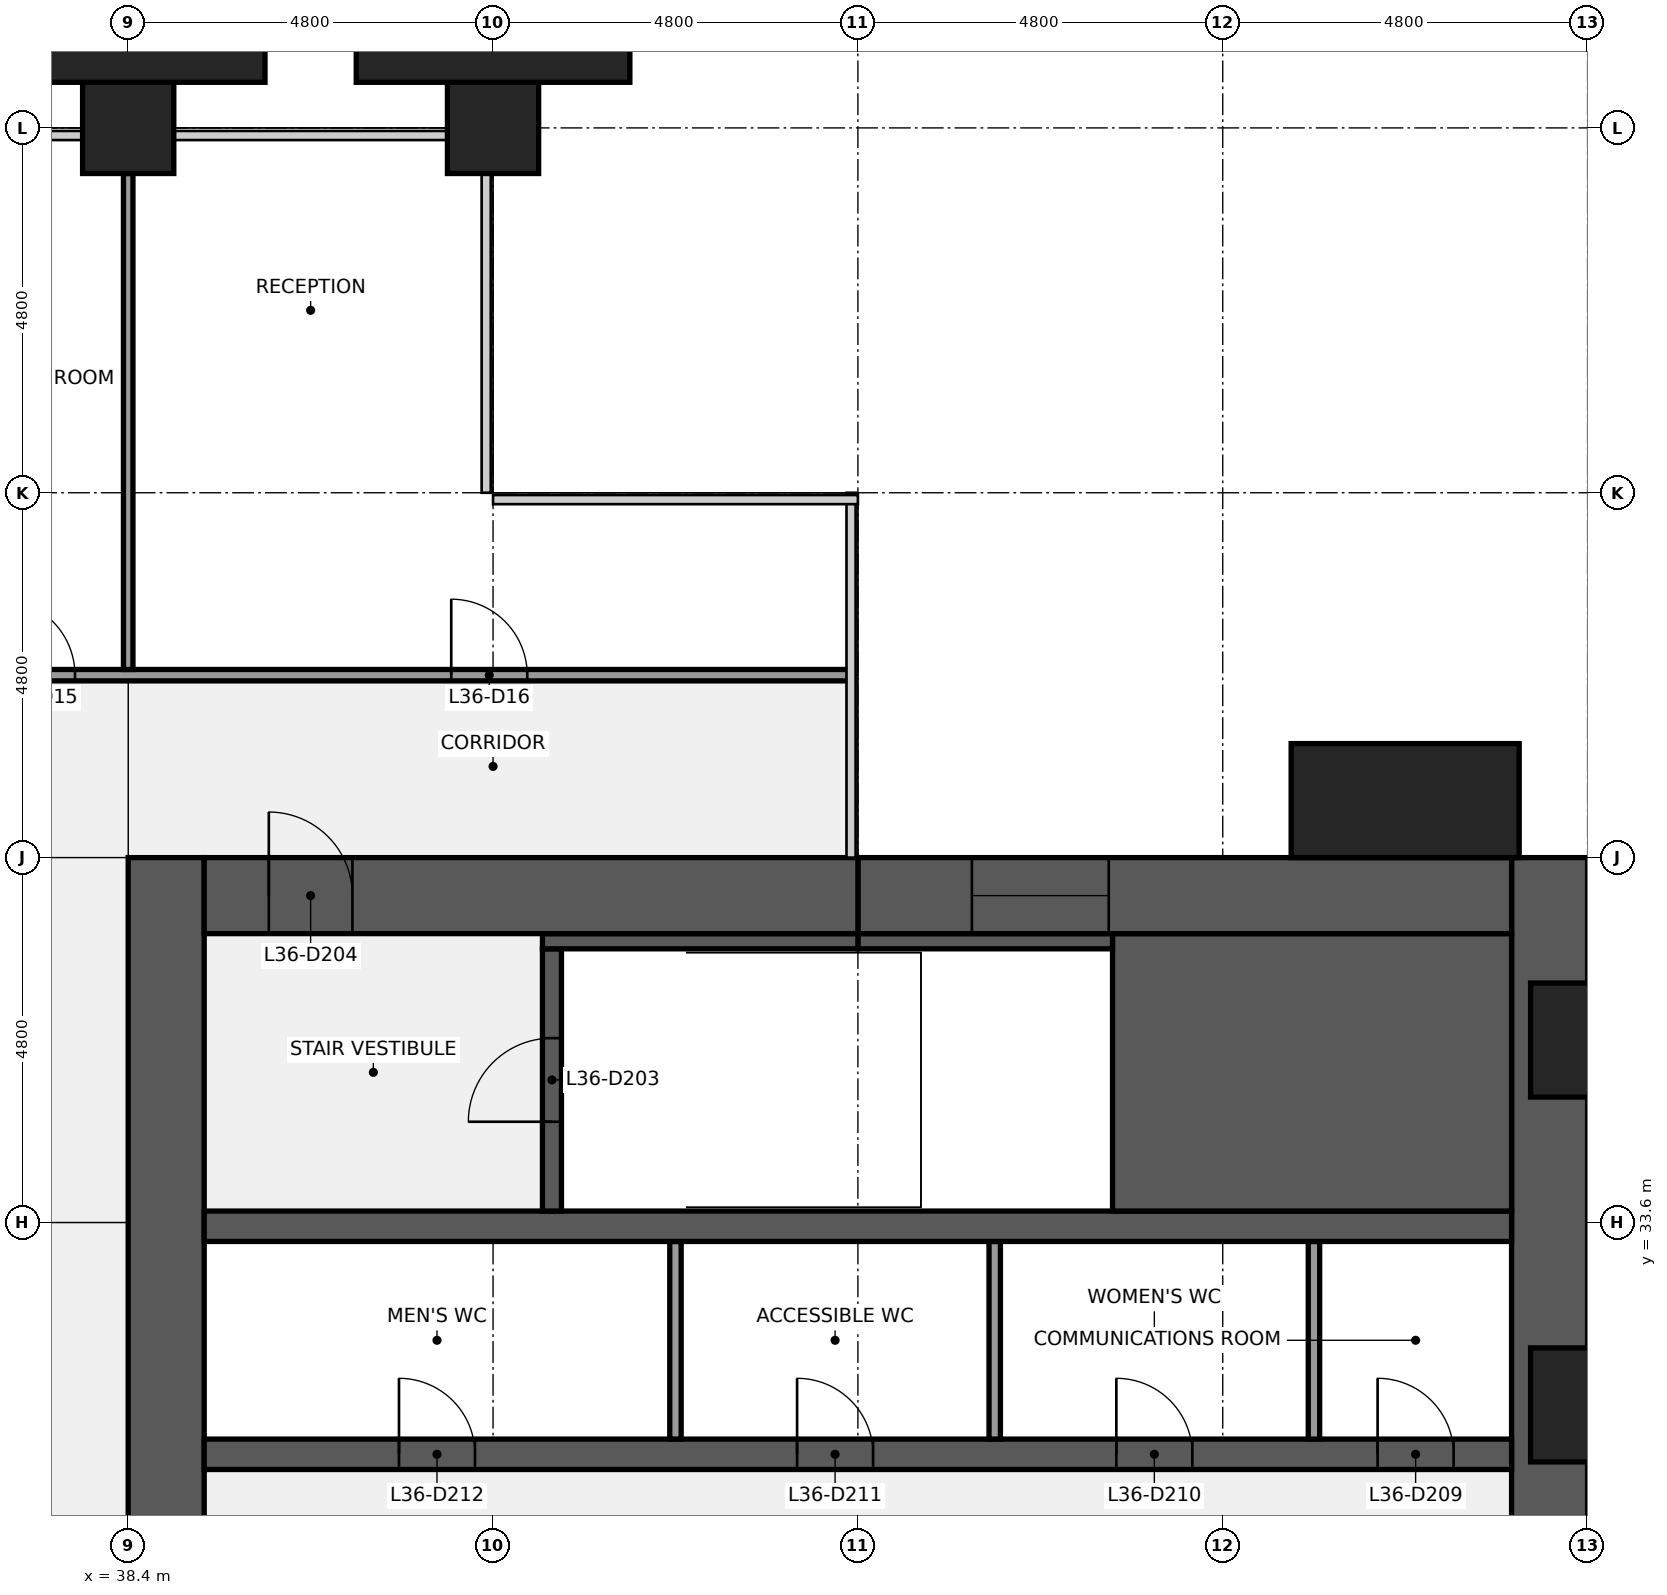
"""IFC4 building model, lengths in metres.
Left out: names, types, materials, properties, quantities, classifications, styles, units other than length and angle.
Written with IfcOpenShell. Run it as: python <this file> out.ifc"""

import sys

from ifc_helpers import new_model, si_unit, direction, frame, frame_2d, origin, origin_2d, place, context, subcontext, project, spatial, rectangle, extrude, element, fill, save


model = new_model("IFC4")
c1 = context("Model", 3, precision=1e-05, world=origin(), true_north=direction((0.0, 1.0)))
c2 = subcontext(c1, "Body", "Model", "MODEL_VIEW")
j1 = project(units=[si_unit("LENGTHUNIT", "METRE"), si_unit("PLANEANGLEUNIT", "RADIAN")], contexts=[c1])
p1 = place(None, origin())
s1 = spatial("IfcSite", under=j1, at=p1, CompositionType="ELEMENT")
p2 = place(p1, origin())
s2 = spatial("IfcBuilding", under=s1, at=p2, CompositionType="ELEMENT")
p3 = place(p2, frame((0.0, 0.0, 164.1)))
s3 = spatial("IfcBuildingStorey", under=s2, at=p3, CompositionType="ELEMENT", Elevation=164.1)
for number, where, z_axis, x_axis in (
    (1, (38.4, 48.0, 0.0), (0.0, 0.0, 1.0), (1.0, 0.0, 0.0)),
    (2, (43.2, 48.0, 0.0), (0.0, 0.0, 1.0), (1.0, 0.0, 0.0)),
):
    element("IfcColumn", number, at=place(p3, frame(where, z_axis=z_axis, x_axis=x_axis)), inside=s3, PredefinedType="COLUMN", context=c2, shape_type="SweptSolid", body=[
        extrude(rectangle(XDim=1.2, YDim=1.2, at=origin_2d()), origin(), (0.0, 0.0, 1.0), 4.0),
    ])
p4 = place(p3, frame((57.1, 38.4, 0.0), z_axis=(0.0, 0.0, 1.0), x_axis=(0.0, -1.0, 0.0)))
e3 = element("IfcWall", 3, at=p4, inside=s3, PredefinedType="SHEAR", context=c2, shape_type="SweptSolid", body=[
    extrude(rectangle(XDim=28.8, YDim=1.0, at=frame_2d((14.4, 0.0))), origin(), (0.0, 0.0, 1.0), 3.84),
])
p5 = place(p4, frame((18.45, 0.0, 0.9)))
e4 = element("IfcOpeningElement", 4, at=p5, cuts=e3, PredefinedType="OPENING", context=c2, shape_type="SweptSolid", body=[
    extrude(rectangle(XDim=1.5, YDim=1.5, at=frame_2d((0.75, 0.75))), frame((0.0, 0.51, 0.0), z_axis=(0.0, -1.0, 0.0), x_axis=(1.0, 0.0, 0.0)), (0.0, 0.0, 1.0), 1.02),
])
p6 = place(p4, frame((8.85, 0.0, 0.9)))
e5 = element("IfcOpeningElement", 5, at=p6, cuts=e3, PredefinedType="OPENING", context=c2, shape_type="SweptSolid", body=[
    extrude(rectangle(XDim=1.5, YDim=1.5, at=frame_2d((0.75, 0.75))), frame((0.0, 0.51, 0.0), z_axis=(0.0, -1.0, 0.0), x_axis=(1.0, 0.0, 0.0)), (0.0, 0.0, 1.0), 1.02),
])
p7 = place(p3, frame((38.9, 9.6, 0.0), z_axis=(0.0, 0.0, 1.0), x_axis=(0.0, 1.0, 0.0)))
e6 = element("IfcWall", 6, at=p7, inside=s3, PredefinedType="SHEAR", context=c2, shape_type="SweptSolid", body=[
    extrude(rectangle(XDim=28.8, YDim=1.0, at=frame_2d((14.4, 0.0))), origin(), (0.0, 0.0, 1.0), 3.84),
])
p8 = place(p7, frame((8.7, 0.0, 0.0)))
e7 = element("IfcOpeningElement", 7, at=p8, cuts=e6, PredefinedType="OPENING", context=c2, shape_type="SweptSolid", body=[
    extrude(rectangle(XDim=1.8, YDim=2.1, at=frame_2d((0.9, 1.05))), frame((0.0, 0.51, 0.0), z_axis=(0.0, -1.0, 0.0), x_axis=(1.0, 0.0, 0.0)), (0.0, 0.0, 1.0), 1.02),
])
p9 = place(p7, frame((18.3, 0.0, 0.0)))
e8 = element("IfcOpeningElement", 8, at=p9, cuts=e6, PredefinedType="OPENING", context=c2, shape_type="SweptSolid", body=[
    extrude(rectangle(XDim=1.8, YDim=2.1, at=frame_2d((0.9, 1.05))), frame((0.0, 0.51, 0.0), z_axis=(0.0, -1.0, 0.0), x_axis=(1.0, 0.0, 0.0)), (0.0, 0.0, 1.0), 1.02),
])
p10 = place(p3, frame((39.4, 30.55, 0.0), z_axis=(0.0, 0.0, 1.0), x_axis=(1.0, 0.0, 0.0)))
e9 = element("IfcWall", 9, at=p10, inside=s3, PredefinedType="SHEAR", context=c2, shape_type="SweptSolid", body=[
    extrude(rectangle(XDim=17.2, YDim=0.4, at=frame_2d((8.6, 0.0))), origin(), (0.0, 0.0, 1.0), 3.84),
])
p11 = place(p10, frame((15.438, 0.0, 0.0)))
e10 = element("IfcOpeningElement", 10, at=p11, cuts=e9, PredefinedType="OPENING", context=c2, shape_type="SweptSolid", body=[
    extrude(rectangle(XDim=1.0, YDim=2.1, at=frame_2d((0.5, 1.05))), frame((0.0, 0.21, 0.0), z_axis=(0.0, -1.0, 0.0), x_axis=(1.0, 0.0, 0.0)), (0.0, 0.0, 1.0), 0.42),
])
p12 = place(p10, frame((12.0, 0.0, 0.0)))
e11 = element("IfcOpeningElement", 11, at=p12, cuts=e9, PredefinedType="OPENING", context=c2, shape_type="SweptSolid", body=[
    extrude(rectangle(XDim=1.0, YDim=2.1, at=frame_2d((0.5, 1.05))), frame((0.0, 0.21, 0.0), z_axis=(0.0, -1.0, 0.0), x_axis=(1.0, 0.0, 0.0)), (0.0, 0.0, 1.0), 0.42),
])
p13 = place(p10, frame((7.8, 0.0, 0.0)))
e12 = element("IfcOpeningElement", 12, at=p13, cuts=e9, PredefinedType="OPENING", context=c2, shape_type="SweptSolid", body=[
    extrude(rectangle(XDim=1.0, YDim=2.1, at=frame_2d((0.5, 1.05))), frame((0.0, 0.21, 0.0), z_axis=(0.0, -1.0, 0.0), x_axis=(1.0, 0.0, 0.0)), (0.0, 0.0, 1.0), 0.42),
])
p14 = place(p10, frame((2.562, 0.0, 0.0)))
e13 = element("IfcOpeningElement", 13, at=p14, cuts=e9, PredefinedType="OPENING", context=c2, shape_type="SweptSolid", body=[
    extrude(rectangle(XDim=1.0, YDim=2.1, at=frame_2d((0.5, 1.05))), frame((0.0, 0.21, 0.0), z_axis=(0.0, -1.0, 0.0), x_axis=(1.0, 0.0, 0.0)), (0.0, 0.0, 1.0), 0.42),
])
for number, where, z_axis, x_axis in (
    (14, (54.0, 30.75, 0.0), (0.0, 0.0, 1.0), (0.0, 1.0, 0.0)),
    (15, (49.8, 30.75, 0.0), (0.0, 0.0, 1.0), (0.0, 1.0, 0.0)),
    (16, (45.6, 30.75, 0.0), (0.0, 0.0, 1.0), (0.0, 1.0, 0.0)),
):
    element("IfcWall", number, at=place(p3, frame(where, z_axis=z_axis, x_axis=x_axis)), inside=s3, PredefinedType="PARTITIONING", context=c2, shape_type="SweptSolid", body=[
        extrude(rectangle(XDim=2.6, YDim=0.15, at=frame_2d((1.3, 0.0))), origin(), (0.0, 0.0, 1.0), 3.84),
    ])
p15 = place(p3, frame((39.4, 33.55, 0.0), z_axis=(0.0, 0.0, 1.0), x_axis=(1.0, 0.0, 0.0)))
e17 = element("IfcWall", 17, at=p15, inside=s3, PredefinedType="SHEAR", context=c2, shape_type="SweptSolid", body=[
    extrude(rectangle(XDim=17.2, YDim=0.4, at=frame_2d((8.6, 0.0))), origin(), (0.0, 0.0, 1.0), 3.84),
])
p16 = place(p3, frame((51.35, 35.575, 0.0), z_axis=(0.0, 0.0, 1.0), x_axis=(1.0, 0.0, 0.0)))
e18 = element("IfcWall", 18, at=p16, inside=s3, PredefinedType="SHEAR", context=c2, shape_type="SweptSolid", body=[
    extrude(rectangle(XDim=5.25, YDim=3.65, at=frame_2d((2.625, 0.0))), origin(), (0.0, 0.0, 1.0), 3.84),
])
p17 = place(p3, frame((43.975, 33.75, 0.0), z_axis=(0.0, 0.0, 1.0), x_axis=(0.0, 1.0, 0.0)))
e19 = element("IfcWall", 19, at=p17, inside=s3, PredefinedType="SHEAR", context=c2, shape_type="SweptSolid", body=[
    extrude(rectangle(XDim=3.45, YDim=0.25, at=frame_2d((1.725, 0.0))), origin(), (0.0, 0.0, 1.0), 3.84),
])
p18 = place(p17, frame((1.175, 0.0, 0.0)))
e20 = element("IfcOpeningElement", 20, at=p18, cuts=e19, PredefinedType="OPENING", context=c2, shape_type="SweptSolid", body=[
    extrude(rectangle(XDim=1.1, YDim=2.1, at=frame_2d((0.55, 1.05))), frame((0.0, 0.135, 0.0), z_axis=(0.0, -1.0, 0.0), x_axis=(1.0, 0.0, 0.0)), (0.0, 0.0, 1.0), 0.27),
])
p19 = place(p3, frame((48.0, 37.3, 0.0), z_axis=(0.0, 0.0, 1.0), x_axis=(1.0, 0.0, 0.0)))
e21 = element("IfcWall", 21, at=p19, inside=s3, PredefinedType="SHEAR", context=c2, shape_type="SweptSolid", body=[
    extrude(rectangle(XDim=3.35, YDim=0.2, at=frame_2d((1.675, 0.0))), origin(), (0.0, 0.0, 1.0), 3.84),
])
p20 = place(p3, frame((43.85, 37.3, 0.0), z_axis=(0.0, 0.0, 1.0), x_axis=(1.0, 0.0, 0.0)))
e22 = element("IfcWall", 22, at=p20, inside=s3, PredefinedType="SHEAR", context=c2, shape_type="SweptSolid", body=[
    extrude(rectangle(XDim=4.15, YDim=0.2, at=frame_2d((2.075, 0.0))), origin(), (0.0, 0.0, 1.0), 3.84),
])
p21 = place(p3, frame((48.0, 37.9, 0.0), z_axis=(0.0, 0.0, 1.0), x_axis=(1.0, 0.0, 0.0)))
e23 = element("IfcWall", 23, at=p21, inside=s3, PredefinedType="SHEAR", context=c2, shape_type="SweptSolid", body=[
    extrude(rectangle(XDim=8.6, YDim=1.0, at=frame_2d((4.3, 0.0))), origin(), (0.0, 0.0, 1.0), 3.84),
])
p22 = place(p21, frame((1.5, 0.0, 0.9)))
e24 = element("IfcOpeningElement", 24, at=p22, cuts=e23, PredefinedType="OPENING", context=c2, shape_type="SweptSolid", body=[
    extrude(rectangle(XDim=1.8, YDim=1.5, at=frame_2d((0.9, 0.75))), frame((0.0, 0.51, 0.0), z_axis=(0.0, -1.0, 0.0), x_axis=(1.0, 0.0, 0.0)), (0.0, 0.0, 1.0), 1.02),
])
p23 = place(p3, frame((39.4, 37.9, 0.0), z_axis=(0.0, 0.0, 1.0), x_axis=(1.0, 0.0, 0.0)))
e25 = element("IfcWall", 25, at=p23, inside=s3, PredefinedType="SHEAR", context=c2, shape_type="SweptSolid", body=[
    extrude(rectangle(XDim=8.6, YDim=1.0, at=frame_2d((4.3, 0.0))), origin(), (0.0, 0.0, 1.0), 3.84),
])
p24 = place(p23, frame((0.85, 0.0, 0.0)))
e26 = element("IfcOpeningElement", 26, at=p24, cuts=e25, PredefinedType="OPENING", context=c2, shape_type="SweptSolid", body=[
    extrude(rectangle(XDim=1.1, YDim=2.1, at=frame_2d((0.55, 1.05))), frame((0.0, 0.51, 0.0), z_axis=(0.0, -1.0, 0.0), x_axis=(1.0, 0.0, 0.0)), (0.0, 0.0, 1.0), 1.02),
])
p25 = place(p3, frame((9.525, 40.8, 0.0), z_axis=(0.0, 0.0, 1.0), x_axis=(1.0, 0.0, 0.0)))
e27 = element("IfcWall", 27, at=p25, inside=s3, PredefinedType="PARTITIONING", context=c2, shape_type="SweptSolid", body=[
    extrude(rectangle(XDim=38.375, YDim=0.15, at=frame_2d((19.188, 0.0))), origin(), (0.0, 0.0, 1.0), 2.936),
])
p26 = place(p25, frame((4.375, 0.0, 0.0)))
e28 = element("IfcOpeningElement", 28, at=p26, cuts=e27, PredefinedType="OPENING", context=c2, shape_type="SweptSolid", body=[
    extrude(rectangle(XDim=1.0, YDim=2.1, at=frame_2d((0.5, 1.05))), frame((0.0, 0.085, 0.0), z_axis=(0.0, -1.0, 0.0), x_axis=(1.0, 0.0, 0.0)), (0.0, 0.0, 1.0), 0.17),
])
p27 = place(p25, frame((12.775, 0.0, 0.0)))
e29 = element("IfcOpeningElement", 29, at=p27, cuts=e27, PredefinedType="OPENING", context=c2, shape_type="SweptSolid", body=[
    extrude(rectangle(XDim=1.0, YDim=2.1, at=frame_2d((0.5, 1.05))), frame((0.0, 0.085, 0.0), z_axis=(0.0, -1.0, 0.0), x_axis=(1.0, 0.0, 0.0)), (0.0, 0.0, 1.0), 0.17),
])
p28 = place(p25, frame((17.575, 0.0, 0.0)))
e30 = element("IfcOpeningElement", 30, at=p28, cuts=e27, PredefinedType="OPENING", context=c2, shape_type="SweptSolid", body=[
    extrude(rectangle(XDim=1.0, YDim=2.1, at=frame_2d((0.5, 1.05))), frame((0.0, 0.085, 0.0), z_axis=(0.0, -1.0, 0.0), x_axis=(1.0, 0.0, 0.0)), (0.0, 0.0, 1.0), 0.17),
])
p29 = place(p25, frame((19.975, 0.0, 0.0)))
e31 = element("IfcOpeningElement", 31, at=p29, cuts=e27, PredefinedType="OPENING", context=c2, shape_type="SweptSolid", body=[
    extrude(rectangle(XDim=1.0, YDim=2.1, at=frame_2d((0.5, 1.05))), frame((0.0, 0.085, 0.0), z_axis=(0.0, -1.0, 0.0), x_axis=(1.0, 0.0, 0.0)), (0.0, 0.0, 1.0), 0.17),
])
p30 = place(p25, frame((23.575, 0.0, 0.0)))
e32 = element("IfcOpeningElement", 32, at=p30, cuts=e27, PredefinedType="OPENING", context=c2, shape_type="SweptSolid", body=[
    extrude(rectangle(XDim=1.0, YDim=2.1, at=frame_2d((0.5, 1.05))), frame((0.0, 0.085, 0.0), z_axis=(0.0, -1.0, 0.0), x_axis=(1.0, 0.0, 0.0)), (0.0, 0.0, 1.0), 0.17),
])
p31 = place(p25, frame((27.175, 0.0, 0.0)))
e33 = element("IfcOpeningElement", 33, at=p31, cuts=e27, PredefinedType="OPENING", context=c2, shape_type="SweptSolid", body=[
    extrude(rectangle(XDim=1.0, YDim=2.1, at=frame_2d((0.5, 1.05))), frame((0.0, 0.085, 0.0), z_axis=(0.0, -1.0, 0.0), x_axis=(1.0, 0.0, 0.0)), (0.0, 0.0, 1.0), 0.17),
])
p32 = place(p25, frame((33.125, 0.0, 0.0)))
e34 = element("IfcOpeningElement", 34, at=p32, cuts=e27, PredefinedType="OPENING", context=c2, shape_type="SweptSolid", body=[
    extrude(rectangle(XDim=1.0, YDim=2.1, at=frame_2d((0.5, 1.05))), frame((0.0, 0.085, 0.0), z_axis=(0.0, -1.0, 0.0), x_axis=(1.0, 0.0, 0.0)), (0.0, 0.0, 1.0), 0.17),
])
p33 = place(p3, frame((38.4, 40.875, 0.0), z_axis=(0.0, 0.0, 1.0), x_axis=(0.0, 1.0, 0.0)))
e35 = element("IfcWall", 35, at=p33, inside=s3, PredefinedType="PARTITIONING", context=c2, shape_type="SweptSolid", body=[
    extrude(rectangle(XDim=6.525, YDim=0.125, at=frame_2d((3.262, 0.0))), origin(), (0.0, 0.0, 1.0), 2.936),
])
p34 = place(p3, frame((55.2, 39.15, 0.0), z_axis=(0.0, 0.0, 1.0), x_axis=(1.0, 0.0, 0.0)))
e36 = element("IfcColumn", 36, at=p34, inside=s3, PredefinedType="PILASTER", context=c2, shape_type="SweptSolid", body=[
    extrude(rectangle(XDim=3.0, YDim=1.5, at=origin_2d()), origin(), (0.0, 0.0, 1.0), 4.0),
])
for number, where, z_axis, x_axis in (
    (37, (38.4, 49.05, 0.0), (0.0, 0.0, 1.0), (1.0, 0.0, 0.0)),
    (38, (43.2, 49.05, 0.0), (0.0, 0.0, 1.0), (1.0, 0.0, 0.0)),
):
    element("IfcColumn", number, at=place(p3, frame(where, z_axis=z_axis, x_axis=x_axis)), inside=s3, PredefinedType="PILASTER", context=c2, shape_type="SweptSolid", body=[
        extrude(rectangle(XDim=3.6, YDim=0.9, at=origin_2d()), origin(), (0.0, 0.0, 1.0), 4.0),
    ])
p35 = place(p18, origin())
e39 = element("IfcDoor", 39, at=p35, inside=s3, OperationType="SINGLE_SWING_LEFT", PredefinedType="DOOR", context=c2, shape_type="SweptSolid", body=[
    extrude(rectangle(XDim=1.1, YDim=2.1, at=frame_2d((0.55, 1.05))), frame((0.0, 0.025, 0.0), z_axis=(0.0, -1.0, 0.0), x_axis=(1.0, 0.0, 0.0)), (0.0, 0.0, 1.0), 0.05),
])
fill(e20, e39)
p36 = place(p24, origin())
e40 = element("IfcDoor", 40, at=p36, inside=s3, OperationType="SINGLE_SWING_LEFT", PredefinedType="DOOR", context=c2, shape_type="SweptSolid", body=[
    extrude(rectangle(XDim=1.1, YDim=2.1, at=frame_2d((0.55, 1.05))), frame((0.0, 0.025, 0.0), z_axis=(0.0, -1.0, 0.0), x_axis=(1.0, 0.0, 0.0)), (0.0, 0.0, 1.0), 0.05),
])
fill(e26, e40)
p37 = place(p11, origin())
e41 = element("IfcDoor", 41, at=p37, inside=s3, OperationType="SINGLE_SWING_LEFT", PredefinedType="DOOR", context=c2, shape_type="SweptSolid", body=[
    extrude(rectangle(XDim=1.0, YDim=2.1, at=frame_2d((0.5, 1.05))), frame((0.0, 0.025, 0.0), z_axis=(0.0, -1.0, 0.0), x_axis=(1.0, 0.0, 0.0)), (0.0, 0.0, 1.0), 0.05),
])
fill(e10, e41)
p38 = place(p12, origin())
e42 = element("IfcDoor", 42, at=p38, inside=s3, OperationType="SINGLE_SWING_LEFT", PredefinedType="DOOR", context=c2, shape_type="SweptSolid", body=[
    extrude(rectangle(XDim=1.0, YDim=2.1, at=frame_2d((0.5, 1.05))), frame((0.0, 0.025, 0.0), z_axis=(0.0, -1.0, 0.0), x_axis=(1.0, 0.0, 0.0)), (0.0, 0.0, 1.0), 0.05),
])
fill(e11, e42)
p39 = place(p13, origin())
e43 = element("IfcDoor", 43, at=p39, inside=s3, OperationType="SINGLE_SWING_LEFT", PredefinedType="DOOR", context=c2, shape_type="SweptSolid", body=[
    extrude(rectangle(XDim=1.0, YDim=2.1, at=frame_2d((0.5, 1.05))), frame((0.0, 0.025, 0.0), z_axis=(0.0, -1.0, 0.0), x_axis=(1.0, 0.0, 0.0)), (0.0, 0.0, 1.0), 0.05),
])
fill(e12, e43)
p40 = place(p14, origin())
e44 = element("IfcDoor", 44, at=p40, inside=s3, OperationType="SINGLE_SWING_LEFT", PredefinedType="DOOR", context=c2, shape_type="SweptSolid", body=[
    extrude(rectangle(XDim=1.0, YDim=2.1, at=frame_2d((0.5, 1.05))), frame((0.0, 0.025, 0.0), z_axis=(0.0, -1.0, 0.0), x_axis=(1.0, 0.0, 0.0)), (0.0, 0.0, 1.0), 0.05),
])
fill(e13, e44)
p41 = place(p22, origin())
e45 = element("IfcWindow", 45, at=p41, inside=s3, PartitioningType="SINGLE_PANEL", PredefinedType="WINDOW", context=c2, shape_type="SweptSolid", body=[
    extrude(rectangle(XDim=1.8, YDim=1.5, at=frame_2d((0.9, 0.75))), frame((0.0, 0.03, 0.0), z_axis=(0.0, -1.0, 0.0), x_axis=(1.0, 0.0, 0.0)), (0.0, 0.0, 1.0), 0.06),
])
fill(e24, e45)
p42 = place(p31, origin())
e46 = element("IfcDoor", 46, at=p42, inside=s3, OperationType="SINGLE_SWING_LEFT", PredefinedType="DOOR", context=c2, shape_type="SweptSolid", body=[
    extrude(rectangle(XDim=1.0, YDim=2.1, at=frame_2d((0.5, 1.05))), frame((0.0, 0.025, 0.0), z_axis=(0.0, -1.0, 0.0), x_axis=(1.0, 0.0, 0.0)), (0.0, 0.0, 1.0), 0.05),
])
fill(e33, e46)
p43 = place(p32, origin())
e47 = element("IfcDoor", 47, at=p43, inside=s3, OperationType="SINGLE_SWING_LEFT", PredefinedType="DOOR", context=c2, shape_type="SweptSolid", body=[
    extrude(rectangle(XDim=1.0, YDim=2.1, at=frame_2d((0.5, 1.05))), frame((0.0, 0.025, 0.0), z_axis=(0.0, -1.0, 0.0), x_axis=(1.0, 0.0, 0.0)), (0.0, 0.0, 1.0), 0.05),
])
fill(e34, e47)
save(model, sys.argv[1])
